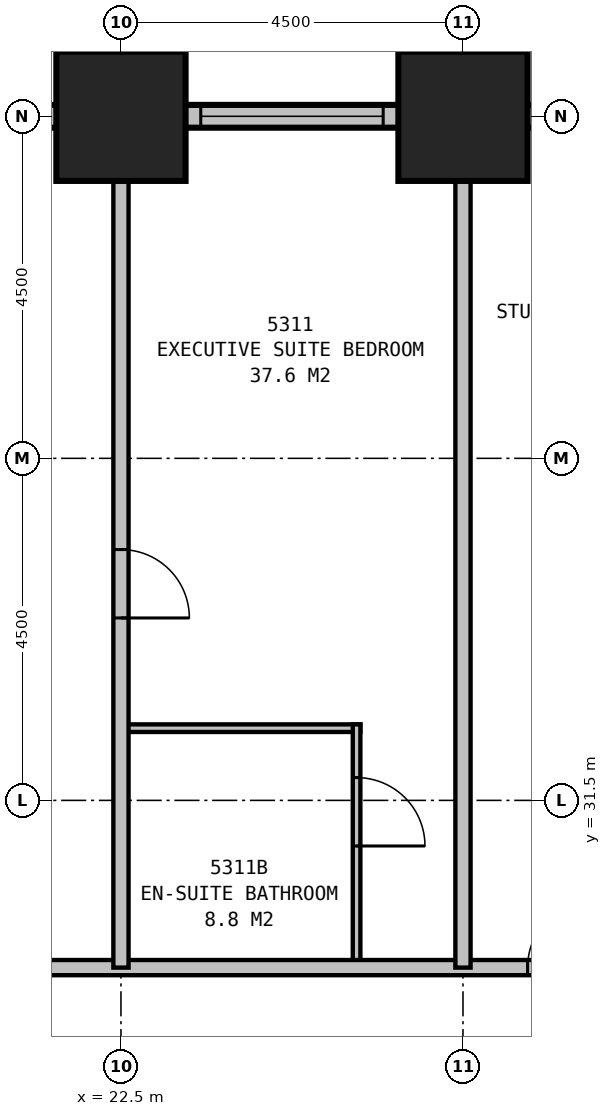
"""IFC4 building model, lengths in metres.
Left out: names, types, materials, properties, quantities, classifications, styles, units other than length and angle.
Written with IfcOpenShell. Run it as: python <this file> out.ifc"""

import sys

from ifc_helpers import new_model, si_unit, direction, frame, frame_2d, origin, origin_2d, place, context, subcontext, project, spatial, rectangle, extrude, element, fill, save


model = new_model("IFC4")
c1 = context("Model", 3, precision=1e-05, world=origin(), true_north=direction((0.0, 1.0)))
c2 = subcontext(c1, "Body", "Model", "MODEL_VIEW")
j1 = project(units=[si_unit("LENGTHUNIT", "METRE"), si_unit("PLANEANGLEUNIT", "RADIAN")], contexts=[c1])
p1 = place(None, origin())
s1 = spatial("IfcSite", under=j1, at=p1, CompositionType="ELEMENT")
p2 = place(p1, origin())
s2 = spatial("IfcBuilding", under=s1, at=p2, CompositionType="ELEMENT")
p3 = place(p2, frame((0.0, 0.0, 204.4)))
s3 = spatial("IfcBuildingStorey", under=s2, at=p3, CompositionType="ELEMENT", Elevation=204.4)
for number, where, z_axis, x_axis in (
    (1, (27.0, 40.5, 0.0), (0.0, 0.0, 1.0), (1.0, 0.0, 0.0)),
    (2, (22.5, 40.5, 0.0), (0.0, 0.0, 1.0), (1.0, 0.0, 0.0)),
):
    element("IfcColumn", number, at=place(p3, frame(where, z_axis=z_axis, x_axis=x_axis)), inside=s3, PredefinedType="COLUMN", context=c2, shape_type="SweptSolid", body=[
        extrude(rectangle(XDim=1.7, YDim=1.7, at=origin_2d()), origin(), (0.0, 0.0, 1.0), 3.5),
    ])
p4 = place(p3, frame((40.65, 40.5, 0.0), z_axis=(0.0, 0.0, 1.0), x_axis=(-1.0, 0.0, 0.0)))
e3 = element("IfcWall", 3, at=p4, inside=s3, PredefinedType="STANDARD", context=c2, shape_type="SweptSolid", body=[
    extrude(rectangle(XDim=31.8, YDim=0.3, at=frame_2d((15.9, 0.0))), origin(), (0.0, 0.0, 1.0), 2.25),
])
p5 = place(p4, frame((1.2, 0.0, 0.5)))
e4 = element("IfcOpeningElement", 4, at=p5, cuts=e3, PredefinedType="OPENING", context=c2, shape_type="SweptSolid", body=[
    extrude(rectangle(XDim=2.4, YDim=1.6, at=frame_2d((1.2, 0.8))), frame((0.0, 0.16, 0.0), z_axis=(0.0, -1.0, 0.0), x_axis=(1.0, 0.0, 0.0)), (0.0, 0.0, 1.0), 0.32),
])
p6 = place(p4, frame((5.7, 0.0, 0.5)))
e5 = element("IfcOpeningElement", 5, at=p6, cuts=e3, PredefinedType="OPENING", context=c2, shape_type="SweptSolid", body=[
    extrude(rectangle(XDim=2.4, YDim=1.6, at=frame_2d((1.2, 0.8))), frame((0.0, 0.16, 0.0), z_axis=(0.0, -1.0, 0.0), x_axis=(1.0, 0.0, 0.0)), (0.0, 0.0, 1.0), 0.32),
])
p7 = place(p4, frame((10.2, 0.0, 0.5)))
e6 = element("IfcOpeningElement", 6, at=p7, cuts=e3, PredefinedType="OPENING", context=c2, shape_type="SweptSolid", body=[
    extrude(rectangle(XDim=2.4, YDim=1.6, at=frame_2d((1.2, 0.8))), frame((0.0, 0.16, 0.0), z_axis=(0.0, -1.0, 0.0), x_axis=(1.0, 0.0, 0.0)), (0.0, 0.0, 1.0), 0.32),
])
p8 = place(p4, frame((14.7, 0.0, 0.5)))
e7 = element("IfcOpeningElement", 7, at=p8, cuts=e3, PredefinedType="OPENING", context=c2, shape_type="SweptSolid", body=[
    extrude(rectangle(XDim=2.4, YDim=1.6, at=frame_2d((1.2, 0.8))), frame((0.0, 0.16, 0.0), z_axis=(0.0, -1.0, 0.0), x_axis=(1.0, 0.0, 0.0)), (0.0, 0.0, 1.0), 0.32),
])
p9 = place(p4, frame((19.2, 0.0, 0.5)))
e8 = element("IfcOpeningElement", 8, at=p9, cuts=e3, PredefinedType="OPENING", context=c2, shape_type="SweptSolid", body=[
    extrude(rectangle(XDim=2.4, YDim=1.6, at=frame_2d((1.2, 0.8))), frame((0.0, 0.16, 0.0), z_axis=(0.0, -1.0, 0.0), x_axis=(1.0, 0.0, 0.0)), (0.0, 0.0, 1.0), 0.32),
])
p10 = place(p4, frame((23.7, 0.0, 0.5)))
e9 = element("IfcOpeningElement", 9, at=p10, cuts=e3, PredefinedType="OPENING", context=c2, shape_type="SweptSolid", body=[
    extrude(rectangle(XDim=2.4, YDim=1.6, at=frame_2d((1.2, 0.8))), frame((0.0, 0.16, 0.0), z_axis=(0.0, -1.0, 0.0), x_axis=(1.0, 0.0, 0.0)), (0.0, 0.0, 1.0), 0.32),
])
p11 = place(p4, frame((28.2, 0.0, 0.5)))
e10 = element("IfcOpeningElement", 10, at=p11, cuts=e3, PredefinedType="OPENING", context=c2, shape_type="SweptSolid", body=[
    extrude(rectangle(XDim=2.4, YDim=1.6, at=frame_2d((1.2, 0.8))), frame((0.0, 0.16, 0.0), z_axis=(0.0, -1.0, 0.0), x_axis=(1.0, 0.0, 0.0)), (0.0, 0.0, 1.0), 0.32),
])
p12 = place(p3, frame((11.2, 29.3, 0.0), z_axis=(0.0, 0.0, 1.0), x_axis=(1.0, 0.0, 0.0)))
e11 = element("IfcWall", 11, at=p12, inside=s3, PredefinedType="PARTITIONING", context=c2, shape_type="SweptSolid", body=[
    extrude(rectangle(XDim=27.1, YDim=0.2, at=frame_2d((13.55, 0.0))), origin(), (0.0, 0.0, 1.0), 3.25),
])
p13 = place(p12, frame((3.15, 0.0, 0.0)))
e12 = element("IfcOpeningElement", 12, at=p13, cuts=e11, PredefinedType="OPENING", context=c2, shape_type="SweptSolid", body=[
    extrude(rectangle(XDim=0.9, YDim=2.1, at=frame_2d((0.45, 1.05))), frame((0.0, 0.11, 0.0), z_axis=(0.0, -1.0, 0.0), x_axis=(1.0, 0.0, 0.0)), (0.0, 0.0, 1.0), 0.22),
])
p14 = place(p12, frame((16.65, 0.0, 0.0)))
e13 = element("IfcOpeningElement", 13, at=p14, cuts=e11, PredefinedType="OPENING", context=c2, shape_type="SweptSolid", body=[
    extrude(rectangle(XDim=0.9, YDim=2.1, at=frame_2d((0.45, 1.05))), frame((0.0, 0.11, 0.0), z_axis=(0.0, -1.0, 0.0), x_axis=(1.0, 0.0, 0.0)), (0.0, 0.0, 1.0), 0.22),
])
p15 = place(p12, frame((25.5, 0.0, 0.0)))
e14 = element("IfcOpeningElement", 14, at=p15, cuts=e11, PredefinedType="OPENING", context=c2, shape_type="SweptSolid", body=[
    extrude(rectangle(XDim=0.9, YDim=2.1, at=frame_2d((0.45, 1.05))), frame((0.0, 0.11, 0.0), z_axis=(0.0, -1.0, 0.0), x_axis=(1.0, 0.0, 0.0)), (0.0, 0.0, 1.0), 0.22),
])
p16 = place(p12, frame((0.7, 0.0, 0.0)))
e15 = element("IfcOpeningElement", 15, at=p16, cuts=e11, PredefinedType="OPENING", context=c2, shape_type="SweptSolid", body=[
    extrude(rectangle(XDim=0.9, YDim=2.1, at=frame_2d((0.45, 1.05))), frame((0.0, 0.11, 0.0), z_axis=(0.0, -1.0, 0.0), x_axis=(1.0, 0.0, 0.0)), (0.0, 0.0, 1.0), 0.22),
])
p17 = place(p3, frame((22.5, 29.3, 0.0), z_axis=(0.0, 0.0, 1.0), x_axis=(0.0, 1.0, 0.0)))
e16 = element("IfcWall", 16, at=p17, inside=s3, PredefinedType="PARTITIONING", context=c2, shape_type="SweptSolid", body=[
    extrude(rectangle(XDim=11.2, YDim=0.2, at=frame_2d((5.6, 0.0))), origin(), (0.0, 0.0, 1.0), 2.25),
])
p18 = place(p17, frame((5.5, 0.0, 0.0), z_axis=(0.0, 0.0, 1.0), x_axis=(-1.0, 0.0, 0.0)))
e17 = element("IfcOpeningElement", 17, at=p18, cuts=e16, PredefinedType="OPENING", context=c2, shape_type="SweptSolid", body=[
    extrude(rectangle(XDim=0.9, YDim=2.1, at=frame_2d((0.45, 1.05))), frame((0.0, 0.11, 0.0), z_axis=(0.0, -1.0, 0.0), x_axis=(1.0, 0.0, 0.0)), (0.0, 0.0, 1.0), 0.22),
])
p19 = place(p3, frame((27.0, 29.3, 0.0), z_axis=(0.0, 0.0, 1.0), x_axis=(0.0, 1.0, 0.0)))
e18 = element("IfcWall", 18, at=p19, inside=s3, PredefinedType="PARTITIONING", context=c2, shape_type="SweptSolid", body=[
    extrude(rectangle(XDim=11.2, YDim=0.2, at=frame_2d((5.6, 0.0))), origin(), (0.0, 0.0, 1.0), 2.25),
])
p20 = place(p3, frame((22.5, 32.45, 0.0), z_axis=(0.0, 0.0, 1.0), x_axis=(1.0, 0.0, 0.0)))
e19 = element("IfcWall", 19, at=p20, inside=s3, PredefinedType="PLUMBINGWALL", context=c2, shape_type="SweptSolid", body=[
    extrude(rectangle(XDim=3.15, YDim=0.1, at=frame_2d((1.575, 0.0))), origin(), (0.0, 0.0, 1.0), 3.25),
])
p21 = place(p3, frame((25.6, 29.3, 0.0), z_axis=(0.0, 0.0, 1.0), x_axis=(0.0, 1.0, 0.0)))
e20 = element("IfcWall", 20, at=p21, inside=s3, PredefinedType="PLUMBINGWALL", context=c2, shape_type="SweptSolid", body=[
    extrude(rectangle(XDim=3.2, YDim=0.1, at=frame_2d((1.6, 0.0))), origin(), (0.0, 0.0, 1.0), 3.25),
])
p22 = place(p21, frame((2.5, 0.0, 0.0), z_axis=(0.0, 0.0, 1.0), x_axis=(-1.0, 0.0, 0.0)))
e21 = element("IfcOpeningElement", 21, at=p22, cuts=e20, PredefinedType="OPENING", context=c2, shape_type="SweptSolid", body=[
    extrude(rectangle(XDim=0.9, YDim=2.1, at=frame_2d((0.45, 1.05))), frame((0.0, 0.06, 0.0), z_axis=(0.0, -1.0, 0.0), x_axis=(1.0, 0.0, 0.0)), (0.0, 0.0, 1.0), 0.12),
])
p23 = place(p8, origin())
e22 = element("IfcWindow", 22, at=p23, inside=s3, PartitioningType="SINGLE_PANEL", PredefinedType="WINDOW", context=c2, shape_type="SweptSolid", body=[
    extrude(rectangle(XDim=2.4, YDim=1.6, at=frame_2d((1.2, 0.8))), frame((0.0, 0.03, 0.0), z_axis=(0.0, -1.0, 0.0), x_axis=(1.0, 0.0, 0.0)), (0.0, 0.0, 1.0), 0.06),
])
fill(e7, e22)
p24 = place(p14, origin())
e23 = element("IfcDoor", 23, at=p24, inside=s3, OperationType="SINGLE_SWING_RIGHT", PredefinedType="DOOR", context=c2, shape_type="SweptSolid", body=[
    extrude(rectangle(XDim=0.9, YDim=2.1, at=frame_2d((0.45, 1.05))), frame((0.0, 0.025, 0.0), z_axis=(0.0, -1.0, 0.0), x_axis=(1.0, 0.0, 0.0)), (0.0, 0.0, 1.0), 0.05),
])
fill(e13, e23)
p25 = place(p18, origin())
e24 = element("IfcDoor", 24, at=p25, inside=s3, OperationType="SINGLE_SWING_RIGHT", PredefinedType="DOOR", context=c2, shape_type="SweptSolid", body=[
    extrude(rectangle(XDim=0.9, YDim=2.1, at=frame_2d((0.45, 1.05))), frame((0.0, 0.025, 0.0), z_axis=(0.0, -1.0, 0.0), x_axis=(1.0, 0.0, 0.0)), (0.0, 0.0, 1.0), 0.05),
])
fill(e17, e24)
p26 = place(p22, origin())
e25 = element("IfcDoor", 25, at=p26, inside=s3, OperationType="SINGLE_SWING_RIGHT", PredefinedType="DOOR", context=c2, shape_type="SweptSolid", body=[
    extrude(rectangle(XDim=0.9, YDim=2.1, at=frame_2d((0.45, 1.05))), frame((0.0, 0.025, 0.0), z_axis=(0.0, -1.0, 0.0), x_axis=(1.0, 0.0, 0.0)), (0.0, 0.0, 1.0), 0.05),
])
fill(e21, e25)
save(model, sys.argv[1])
